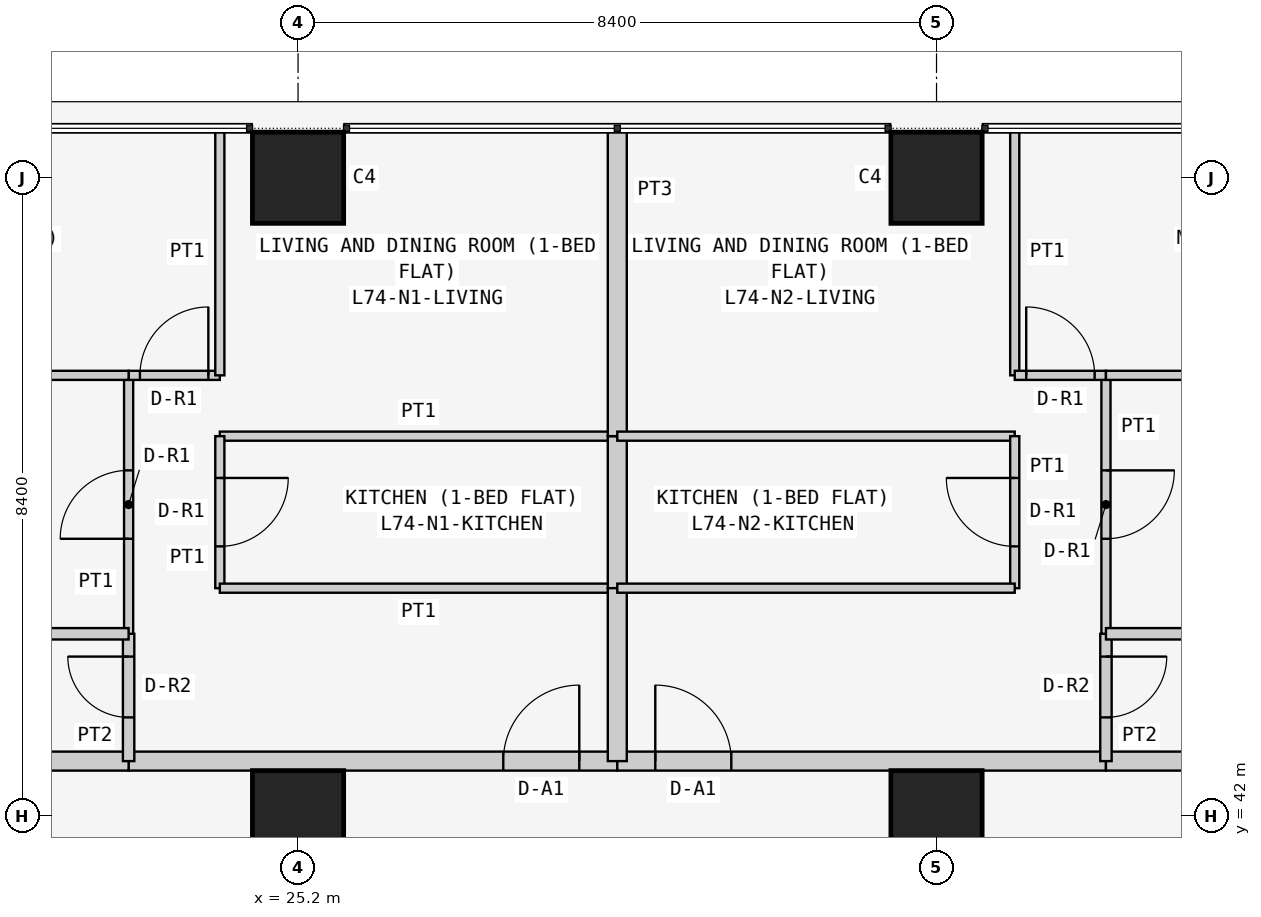
"""IFC4 building model, lengths in metres.
Left out: names, types, materials, properties, quantities, classifications, styles, units other than length and angle.
Written with IfcOpenShell. Run it as: python <this file> out.ifc"""

import sys

from ifc_helpers import new_model, si_unit, direction, frame, frame_2d, origin, origin_2d, place, context, subcontext, project, spatial, rectangle, extrude, element, fill, save


model = new_model("IFC4")
c1 = context("Model", 3, precision=1e-05, world=origin(), true_north=direction((0.0, 1.0)))
c2 = subcontext(c1, "Body", "Model", "MODEL_VIEW")
j1 = project(units=[si_unit("LENGTHUNIT", "METRE"), si_unit("PLANEANGLEUNIT", "RADIAN")], contexts=[c1])
p1 = place(None, origin())
s1 = spatial("IfcSite", under=j1, at=p1, CompositionType="ELEMENT")
p2 = place(p1, origin())
s2 = spatial("IfcBuilding", under=s1, at=p2, CompositionType="ELEMENT")
p3 = place(p2, frame((0.0, 0.0, 282.9)))
s3 = spatial("IfcBuildingStorey", under=s2, at=p3, CompositionType="ELEMENT", Elevation=282.9)
for number, where, z_axis, x_axis in (
    (1, (25.2, 42.0, 0.0), (0.0, 0.0, 1.0), (1.0, 0.0, 0.0)),
    (2, (25.2, 50.4, 0.0), (0.0, 0.0, 1.0), (1.0, 0.0, 0.0)),
    (3, (33.6, 42.0, 0.0), (0.0, 0.0, 1.0), (1.0, 0.0, 0.0)),
    (4, (33.6, 50.4, 0.0), (0.0, 0.0, 1.0), (1.0, 0.0, 0.0)),
):
    element("IfcColumn", number, at=place(p3, frame(where, z_axis=z_axis, x_axis=x_axis)), inside=s3, PredefinedType="COLUMN", context=c2, shape_type="SweptSolid", body=[
        extrude(rectangle(XDim=1.2, YDim=1.2, at=origin_2d()), origin(), (0.0, 0.0, 1.0), 3.6),
    ])
p4 = place(p3, frame((22.971, 42.725, 0.0), z_axis=(0.0, 0.0, 1.0), x_axis=(1.0, 0.0, 0.0)))
e5 = element("IfcWall", 5, at=p4, inside=s3, PredefinedType="PARTITIONING", context=c2, shape_type="SweptSolid", body=[
    extrude(rectangle(XDim=6.429, YDim=0.25, at=frame_2d((3.214, 0.0))), origin(), (0.0, 0.0, 1.0), 3.45),
])
p5 = place(p4, frame((4.929, 0.0, 0.0)))
e6 = element("IfcOpeningElement", 6, at=p5, cuts=e5, PredefinedType="OPENING", context=c2, shape_type="SweptSolid", body=[
    extrude(rectangle(XDim=1.0, YDim=2.1, at=frame_2d((0.5, 1.05))), frame((0.0, 0.135, 0.0), z_axis=(0.0, -1.0, 0.0), x_axis=(1.0, 0.0, 0.0)), (0.0, 0.0, 1.0), 0.27),
])
p6 = place(p3, frame((16.1, 42.725, 0.0), z_axis=(0.0, 0.0, 1.0), x_axis=(1.0, 0.0, 0.0)))
e7 = element("IfcWall", 7, at=p6, inside=s3, PredefinedType="PARTITIONING", context=c2, shape_type="SweptSolid", body=[
    extrude(rectangle(XDim=6.871, YDim=0.25, at=frame_2d((3.436, 0.0))), origin(), (0.0, 0.0, 1.0), 3.45),
])
p7 = place(p3, frame((29.4, 42.725, 0.0), z_axis=(0.0, 0.0, 1.0), x_axis=(1.0, 0.0, 0.0)))
e8 = element("IfcWall", 8, at=p7, inside=s3, PredefinedType="PARTITIONING", context=c2, shape_type="SweptSolid", body=[
    extrude(rectangle(XDim=6.429, YDim=0.25, at=frame_2d((3.215, 0.0))), origin(), (0.0, 0.0, 1.0), 3.45),
])
p8 = place(p7, frame((0.5, 0.0, 0.0)))
e9 = element("IfcOpeningElement", 9, at=p8, cuts=e8, PredefinedType="OPENING", context=c2, shape_type="SweptSolid", body=[
    extrude(rectangle(XDim=1.0, YDim=2.1, at=frame_2d((0.5, 1.05))), frame((0.0, 0.135, 0.0), z_axis=(0.0, -1.0, 0.0), x_axis=(1.0, 0.0, 0.0)), (0.0, 0.0, 1.0), 0.27),
])
p9 = place(p3, frame((35.829, 42.725, 0.0), z_axis=(0.0, 0.0, 1.0), x_axis=(1.0, 0.0, 0.0)))
e10 = element("IfcWall", 10, at=p9, inside=s3, PredefinedType="PARTITIONING", context=c2, shape_type="SweptSolid", body=[
    extrude(rectangle(XDim=6.871, YDim=0.25, at=frame_2d((3.436, 0.0))), origin(), (0.0, 0.0, 1.0), 3.45),
])
p10 = place(p3, frame((29.4, 47.0, 0.0), z_axis=(0.0, 0.0, 1.0), x_axis=(-1.0, 0.0, 0.0)))
e11 = element("IfcWall", 11, at=p10, inside=s3, PredefinedType="PARTITIONING", context=c2, shape_type="SweptSolid", body=[
    extrude(rectangle(XDim=5.229, YDim=0.12, at=frame_2d((2.615, 0.0))), origin(), (0.0, 0.0, 1.0), 3.45),
])
p11 = place(p3, frame((24.171, 47.0, 0.0), z_axis=(0.0, 0.0, 1.0), x_axis=(0.0, -1.0, 0.0)))
e12 = element("IfcWall", 12, at=p11, inside=s3, PredefinedType="PARTITIONING", context=c2, shape_type="SweptSolid", body=[
    extrude(rectangle(XDim=2.0, YDim=0.12, at=frame_2d((1.0, 0.0))), origin(), (0.0, 0.0, 1.0), 3.45),
])
p12 = place(p11, frame((0.55, 0.0, 0.0)))
e13 = element("IfcOpeningElement", 13, at=p12, cuts=e12, PredefinedType="OPENING", context=c2, shape_type="SweptSolid", body=[
    extrude(rectangle(XDim=0.9, YDim=2.1, at=frame_2d((0.45, 1.05))), frame((0.0, 0.07, 0.0), z_axis=(0.0, -1.0, 0.0), x_axis=(1.0, 0.0, 0.0)), (0.0, 0.0, 1.0), 0.14),
])
p13 = place(p3, frame((24.171, 45.0, 0.0), z_axis=(0.0, 0.0, 1.0), x_axis=(1.0, 0.0, 0.0)))
e14 = element("IfcWall", 14, at=p13, inside=s3, PredefinedType="PARTITIONING", context=c2, shape_type="SweptSolid", body=[
    extrude(rectangle(XDim=5.229, YDim=0.12, at=frame_2d((2.615, 0.0))), origin(), (0.0, 0.0, 1.0), 3.45),
])
p14 = place(p3, frame((29.4, 45.0, 0.0), z_axis=(0.0, 0.0, 1.0), x_axis=(0.0, 1.0, 0.0)))
e15 = element("IfcWall", 15, at=p14, inside=s3, PredefinedType="PARTITIONING", context=c2, shape_type="SweptSolid", body=[
    extrude(rectangle(XDim=2.0, YDim=0.25, at=frame_2d((1.0, 0.0))), origin(), (0.0, 0.0, 1.0), 2.848),
])
p15 = place(p3, frame((22.971, 42.725, 0.0), z_axis=(0.0, 0.0, 1.0), x_axis=(0.0, 1.0, 0.0)))
e16 = element("IfcWall", 16, at=p15, inside=s3, PredefinedType="PARTITIONING", context=c2, shape_type="SweptSolid", body=[
    extrude(rectangle(XDim=1.675, YDim=0.15, at=frame_2d((0.837, 0.0))), origin(), (0.0, 0.0, 1.0), 3.45),
])
p16 = place(p15, frame((0.575, 0.0, 0.0)))
e17 = element("IfcOpeningElement", 17, at=p16, cuts=e16, PredefinedType="OPENING", context=c2, shape_type="SweptSolid", body=[
    extrude(rectangle(XDim=0.8, YDim=2.1, at=frame_2d((0.4, 1.05))), frame((0.0, 0.085, 0.0), z_axis=(0.0, -1.0, 0.0), x_axis=(1.0, 0.0, 0.0)), (0.0, 0.0, 1.0), 0.17),
])
p17 = place(p3, frame((22.971, 44.4, 0.0), z_axis=(0.0, 0.0, 1.0), x_axis=(0.0, 1.0, 0.0)))
e18 = element("IfcWall", 18, at=p17, inside=s3, PredefinedType="PARTITIONING", context=c2, shape_type="SweptSolid", body=[
    extrude(rectangle(XDim=3.4, YDim=0.12, at=frame_2d((1.7, 0.0))), origin(), (0.0, 0.0, 1.0), 3.45),
])
p18 = place(p17, frame((1.25, 0.0, 0.0)))
e19 = element("IfcOpeningElement", 19, at=p18, cuts=e18, PredefinedType="OPENING", context=c2, shape_type="SweptSolid", body=[
    extrude(rectangle(XDim=0.9, YDim=2.1, at=frame_2d((0.45, 1.05))), frame((0.0, 0.07, 0.0), z_axis=(0.0, -1.0, 0.0), x_axis=(1.0, 0.0, 0.0)), (0.0, 0.0, 1.0), 0.14),
])
p19 = place(p3, frame((22.971, 47.8, 0.0), z_axis=(0.0, 0.0, 1.0), x_axis=(1.0, 0.0, 0.0)))
e20 = element("IfcWall", 20, at=p19, inside=s3, PredefinedType="PARTITIONING", context=c2, shape_type="SweptSolid", body=[
    extrude(rectangle(XDim=1.2, YDim=0.12, at=frame_2d((0.6, 0.0))), origin(), (0.0, 0.0, 1.0), 3.45),
])
p20 = place(p19, frame((0.149, 0.0, 0.0)))
e21 = element("IfcOpeningElement", 21, at=p20, cuts=e20, PredefinedType="OPENING", context=c2, shape_type="SweptSolid", body=[
    extrude(rectangle(XDim=0.9, YDim=2.1, at=frame_2d((0.45, 1.05))), frame((0.0, 0.07, 0.0), z_axis=(0.0, -1.0, 0.0), x_axis=(1.0, 0.0, 0.0)), (0.0, 0.0, 1.0), 0.14),
])
p21 = place(p3, frame((24.171, 47.8, 0.0), z_axis=(0.0, 0.0, 1.0), x_axis=(0.0, 1.0, 0.0)))
e22 = element("IfcWall", 22, at=p21, inside=s3, PredefinedType="PARTITIONING", context=c2, shape_type="SweptSolid", body=[
    extrude(rectangle(XDim=3.25, YDim=0.12, at=frame_2d((1.625, 0.0))), origin(), (0.0, 0.0, 1.0), 3.45),
])
p22 = place(p3, frame((29.4, 45.0, 0.0), z_axis=(0.0, 0.0, 1.0), x_axis=(0.0, -1.0, 0.0)))
e23 = element("IfcWall", 23, at=p22, inside=s3, PredefinedType="PARTITIONING", context=c2, shape_type="SweptSolid", body=[
    extrude(rectangle(XDim=2.275, YDim=0.25, at=frame_2d((1.137, 0.0))), origin(), (0.0, 0.0, 1.0), 2.848),
])
p23 = place(p3, frame((29.4, 51.05, 0.0), z_axis=(0.0, 0.0, 1.0), x_axis=(0.0, -1.0, 0.0)))
e24 = element("IfcWall", 24, at=p23, inside=s3, PredefinedType="PARTITIONING", context=c2, shape_type="SweptSolid", body=[
    extrude(rectangle(XDim=4.05, YDim=0.25, at=frame_2d((2.025, 0.0))), origin(), (0.0, 0.0, 1.0), 2.848),
])
p24 = place(p3, frame((22.971, 44.4, 0.0), z_axis=(0.0, 0.0, 1.0), x_axis=(-1.0, 0.0, 0.0)))
e25 = element("IfcWall", 25, at=p24, inside=s3, PredefinedType="PARTITIONING", context=c2, shape_type="SweptSolid", body=[
    extrude(rectangle(XDim=6.871, YDim=0.15, at=frame_2d((3.436, 0.0))), origin(), (0.0, 0.0, 1.0), 3.45),
])
p25 = place(p3, frame((22.971, 47.8, 0.0), z_axis=(0.0, 0.0, 1.0), x_axis=(-1.0, 0.0, 0.0)))
e26 = element("IfcWall", 26, at=p25, inside=s3, PredefinedType="PARTITIONING", context=c2, shape_type="SweptSolid", body=[
    extrude(rectangle(XDim=6.871, YDim=0.12, at=frame_2d((3.436, 0.0))), origin(), (0.0, 0.0, 1.0), 3.45),
])
p26 = place(p3, frame((29.4, 47.0, 0.0), z_axis=(0.0, 0.0, 1.0), x_axis=(1.0, 0.0, 0.0)))
e27 = element("IfcWall", 27, at=p26, inside=s3, PredefinedType="PARTITIONING", context=c2, shape_type="SweptSolid", body=[
    extrude(rectangle(XDim=5.229, YDim=0.12, at=frame_2d((2.615, 0.0))), origin(), (0.0, 0.0, 1.0), 3.45),
])
p27 = place(p3, frame((34.629, 47.0, 0.0), z_axis=(0.0, 0.0, 1.0), x_axis=(0.0, -1.0, 0.0)))
e28 = element("IfcWall", 28, at=p27, inside=s3, PredefinedType="PARTITIONING", context=c2, shape_type="SweptSolid", body=[
    extrude(rectangle(XDim=2.0, YDim=0.12, at=frame_2d((1.0, 0.0))), origin(), (0.0, 0.0, 1.0), 3.45),
])
p28 = place(p27, frame((0.55, 0.0, 0.0)))
e29 = element("IfcOpeningElement", 29, at=p28, cuts=e28, PredefinedType="OPENING", context=c2, shape_type="SweptSolid", body=[
    extrude(rectangle(XDim=0.9, YDim=2.1, at=frame_2d((0.45, 1.05))), frame((0.0, 0.07, 0.0), z_axis=(0.0, -1.0, 0.0), x_axis=(1.0, 0.0, 0.0)), (0.0, 0.0, 1.0), 0.14),
])
p29 = place(p3, frame((34.629, 45.0, 0.0), z_axis=(0.0, 0.0, 1.0), x_axis=(-1.0, 0.0, 0.0)))
e30 = element("IfcWall", 30, at=p29, inside=s3, PredefinedType="PARTITIONING", context=c2, shape_type="SweptSolid", body=[
    extrude(rectangle(XDim=5.229, YDim=0.12, at=frame_2d((2.615, 0.0))), origin(), (0.0, 0.0, 1.0), 3.45),
])
p30 = place(p3, frame((35.829, 44.4, 0.0), z_axis=(0.0, 0.0, 1.0), x_axis=(0.0, -1.0, 0.0)))
e31 = element("IfcWall", 31, at=p30, inside=s3, PredefinedType="PARTITIONING", context=c2, shape_type="SweptSolid", body=[
    extrude(rectangle(XDim=1.675, YDim=0.15, at=frame_2d((0.837, 0.0))), origin(), (0.0, 0.0, 1.0), 3.45),
])
p31 = place(p30, frame((0.3, 0.0, 0.0)))
e32 = element("IfcOpeningElement", 32, at=p31, cuts=e31, PredefinedType="OPENING", context=c2, shape_type="SweptSolid", body=[
    extrude(rectangle(XDim=0.8, YDim=2.1, at=frame_2d((0.4, 1.05))), frame((0.0, 0.085, 0.0), z_axis=(0.0, -1.0, 0.0), x_axis=(1.0, 0.0, 0.0)), (0.0, 0.0, 1.0), 0.17),
])
p32 = place(p3, frame((35.829, 47.8, 0.0), z_axis=(0.0, 0.0, 1.0), x_axis=(0.0, -1.0, 0.0)))
e33 = element("IfcWall", 33, at=p32, inside=s3, PredefinedType="PARTITIONING", context=c2, shape_type="SweptSolid", body=[
    extrude(rectangle(XDim=3.4, YDim=0.12, at=frame_2d((1.7, 0.0))), origin(), (0.0, 0.0, 1.0), 3.45),
])
p33 = place(p32, frame((1.25, 0.0, 0.0)))
e34 = element("IfcOpeningElement", 34, at=p33, cuts=e33, PredefinedType="OPENING", context=c2, shape_type="SweptSolid", body=[
    extrude(rectangle(XDim=0.9, YDim=2.1, at=frame_2d((0.45, 1.05))), frame((0.0, 0.07, 0.0), z_axis=(0.0, -1.0, 0.0), x_axis=(1.0, 0.0, 0.0)), (0.0, 0.0, 1.0), 0.14),
])
p34 = place(p3, frame((34.629, 51.05, 0.0), z_axis=(0.0, 0.0, 1.0), x_axis=(0.0, -1.0, 0.0)))
e35 = element("IfcWall", 35, at=p34, inside=s3, PredefinedType="PARTITIONING", context=c2, shape_type="SweptSolid", body=[
    extrude(rectangle(XDim=3.25, YDim=0.12, at=frame_2d((1.625, 0.0))), origin(), (0.0, 0.0, 1.0), 3.45),
])
p35 = place(p3, frame((34.629, 47.8, 0.0), z_axis=(0.0, 0.0, 1.0), x_axis=(1.0, 0.0, 0.0)))
e36 = element("IfcWall", 36, at=p35, inside=s3, PredefinedType="PARTITIONING", context=c2, shape_type="SweptSolid", body=[
    extrude(rectangle(XDim=1.2, YDim=0.12, at=frame_2d((0.6, 0.0))), origin(), (0.0, 0.0, 1.0), 3.45),
])
p36 = place(p35, frame((0.151, 0.0, 0.0)))
e37 = element("IfcOpeningElement", 37, at=p36, cuts=e36, PredefinedType="OPENING", context=c2, shape_type="SweptSolid", body=[
    extrude(rectangle(XDim=0.9, YDim=2.1, at=frame_2d((0.45, 1.05))), frame((0.0, 0.07, 0.0), z_axis=(0.0, -1.0, 0.0), x_axis=(1.0, 0.0, 0.0)), (0.0, 0.0, 1.0), 0.14),
])
p37 = place(p3, frame((35.829, 44.4, 0.0), z_axis=(0.0, 0.0, 1.0), x_axis=(1.0, 0.0, 0.0)))
e38 = element("IfcWall", 38, at=p37, inside=s3, PredefinedType="PARTITIONING", context=c2, shape_type="SweptSolid", body=[
    extrude(rectangle(XDim=6.871, YDim=0.15, at=frame_2d((3.436, 0.0))), origin(), (0.0, 0.0, 1.0), 3.45),
])
p38 = place(p3, frame((35.829, 47.8, 0.0), z_axis=(0.0, 0.0, 1.0), x_axis=(1.0, 0.0, 0.0)))
e39 = element("IfcWall", 39, at=p38, inside=s3, PredefinedType="PARTITIONING", context=c2, shape_type="SweptSolid", body=[
    extrude(rectangle(XDim=6.871, YDim=0.12, at=frame_2d((3.436, 0.0))), origin(), (0.0, 0.0, 1.0), 3.45),
])
p39 = place(p5, origin())
e40 = element("IfcDoor", 40, at=p39, inside=s3, OperationType="SINGLE_SWING_RIGHT", PredefinedType="DOOR", context=c2, shape_type="SweptSolid", body=[
    extrude(rectangle(XDim=1.0, YDim=2.1, at=frame_2d((0.5, 1.05))), frame((0.0, 0.025, 0.0), z_axis=(0.0, -1.0, 0.0), x_axis=(1.0, 0.0, 0.0)), (0.0, 0.0, 1.0), 0.05),
])
fill(e6, e40)
p40 = place(p12, origin())
e41 = element("IfcDoor", 41, at=p40, inside=s3, OperationType="SINGLE_SWING_LEFT", PredefinedType="DOOR", context=c2, shape_type="SweptSolid", body=[
    extrude(rectangle(XDim=0.9, YDim=2.1, at=frame_2d((0.45, 1.05))), frame((0.0, 0.025, 0.0), z_axis=(0.0, -1.0, 0.0), x_axis=(1.0, 0.0, 0.0)), (0.0, 0.0, 1.0), 0.05),
])
fill(e13, e41)
p41 = place(p16, origin())
e42 = element("IfcDoor", 42, at=p41, inside=s3, OperationType="SINGLE_SWING_RIGHT", PredefinedType="DOOR", context=c2, shape_type="SweptSolid", body=[
    extrude(rectangle(XDim=0.8, YDim=2.1, at=frame_2d((0.4, 1.05))), frame((0.0, 0.025, 0.0), z_axis=(0.0, -1.0, 0.0), x_axis=(1.0, 0.0, 0.0)), (0.0, 0.0, 1.0), 0.05),
])
fill(e17, e42)
p42 = place(p18, origin())
e43 = element("IfcDoor", 43, at=p42, inside=s3, OperationType="SINGLE_SWING_LEFT", PredefinedType="DOOR", context=c2, shape_type="SweptSolid", body=[
    extrude(rectangle(XDim=0.9, YDim=2.1, at=frame_2d((0.45, 1.05))), frame((0.0, 0.025, 0.0), z_axis=(0.0, -1.0, 0.0), x_axis=(1.0, 0.0, 0.0)), (0.0, 0.0, 1.0), 0.05),
])
fill(e19, e43)
p43 = place(p20, origin())
e44 = element("IfcDoor", 44, at=p43, inside=s3, OperationType="SINGLE_SWING_RIGHT", PredefinedType="DOOR", context=c2, shape_type="SweptSolid", body=[
    extrude(rectangle(XDim=0.9, YDim=2.1, at=frame_2d((0.45, 1.05))), frame((0.0, 0.025, 0.0), z_axis=(0.0, -1.0, 0.0), x_axis=(1.0, 0.0, 0.0)), (0.0, 0.0, 1.0), 0.05),
])
fill(e21, e44)
p44 = place(p8, origin())
e45 = element("IfcDoor", 45, at=p44, inside=s3, OperationType="SINGLE_SWING_LEFT", PredefinedType="DOOR", context=c2, shape_type="SweptSolid", body=[
    extrude(rectangle(XDim=1.0, YDim=2.1, at=frame_2d((0.5, 1.05))), frame((0.0, 0.025, 0.0), z_axis=(0.0, -1.0, 0.0), x_axis=(1.0, 0.0, 0.0)), (0.0, 0.0, 1.0), 0.05),
])
fill(e9, e45)
p45 = place(p28, frame((0.9, 0.0, 0.0), z_axis=(0.0, 0.0, 1.0), x_axis=(-1.0, 0.0, 0.0)))
e46 = element("IfcDoor", 46, at=p45, inside=s3, OperationType="SINGLE_SWING_RIGHT", PredefinedType="DOOR", context=c2, shape_type="SweptSolid", body=[
    extrude(rectangle(XDim=0.9, YDim=2.1, at=frame_2d((0.45, 1.05))), frame((0.0, 0.025, 0.0), z_axis=(0.0, -1.0, 0.0), x_axis=(1.0, 0.0, 0.0)), (0.0, 0.0, 1.0), 0.05),
])
fill(e29, e46)
p46 = place(p31, origin())
e47 = element("IfcDoor", 47, at=p46, inside=s3, OperationType="SINGLE_SWING_LEFT", PredefinedType="DOOR", context=c2, shape_type="SweptSolid", body=[
    extrude(rectangle(XDim=0.8, YDim=2.1, at=frame_2d((0.4, 1.05))), frame((0.0, 0.025, 0.0), z_axis=(0.0, -1.0, 0.0), x_axis=(1.0, 0.0, 0.0)), (0.0, 0.0, 1.0), 0.05),
])
fill(e32, e47)
p47 = place(p33, origin())
e48 = element("IfcDoor", 48, at=p47, inside=s3, OperationType="SINGLE_SWING_LEFT", PredefinedType="DOOR", context=c2, shape_type="SweptSolid", body=[
    extrude(rectangle(XDim=0.9, YDim=2.1, at=frame_2d((0.45, 1.05))), frame((0.0, 0.025, 0.0), z_axis=(0.0, -1.0, 0.0), x_axis=(1.0, 0.0, 0.0)), (0.0, 0.0, 1.0), 0.05),
])
fill(e34, e48)
p48 = place(p36, origin())
e49 = element("IfcDoor", 49, at=p48, inside=s3, OperationType="SINGLE_SWING_LEFT", PredefinedType="DOOR", context=c2, shape_type="SweptSolid", body=[
    extrude(rectangle(XDim=0.9, YDim=2.1, at=frame_2d((0.45, 1.05))), frame((0.0, 0.025, 0.0), z_axis=(0.0, -1.0, 0.0), x_axis=(1.0, 0.0, 0.0)), (0.0, 0.0, 1.0), 0.05),
])
fill(e37, e49)
save(model, sys.argv[1])
